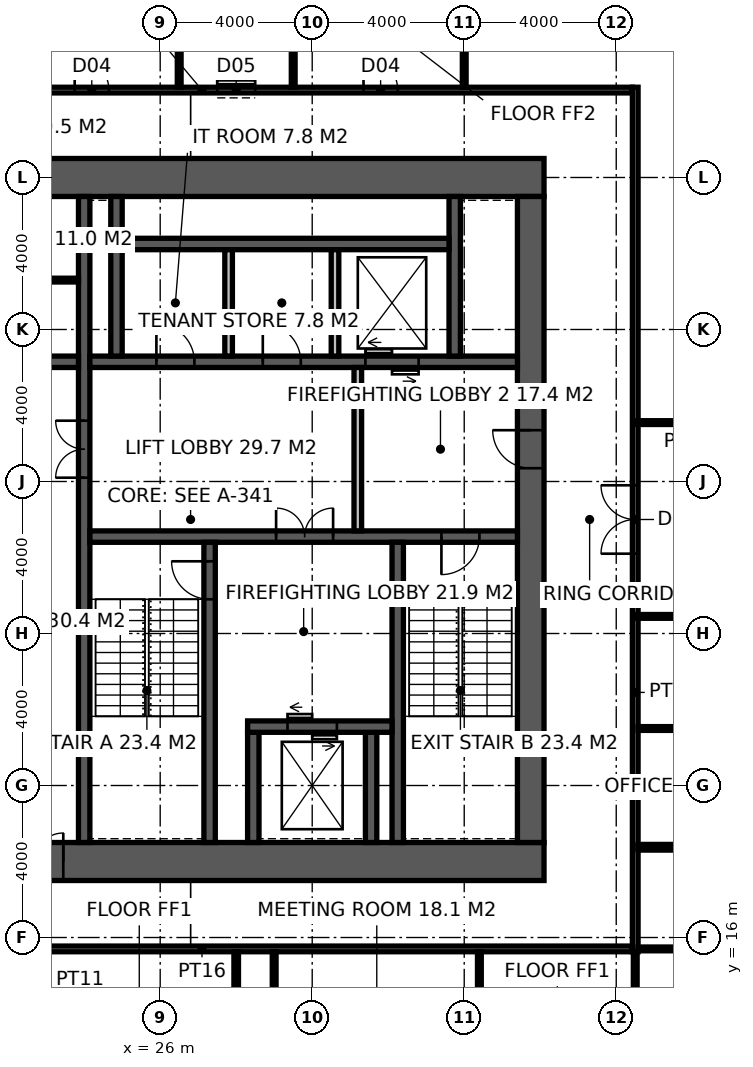
"""IFC4 building model, lengths in metres.
Left out: names, types, materials, properties, quantities, classifications, styles, units other than length and angle.
Written with IfcOpenShell. Run it as: python <this file> out.ifc"""

import sys

from ifc_helpers import new_model, si_unit, direction, frame, frame_2d, origin, place, context, subcontext, project, spatial, rectangle, extrude, element, fill, save


model = new_model("IFC4")
c1 = context("Model", 3, precision=1e-05, world=origin(), true_north=direction((0.0, 1.0)))
c2 = subcontext(c1, "Body", "Model", "MODEL_VIEW")
j1 = project(units=[si_unit("LENGTHUNIT", "METRE"), si_unit("PLANEANGLEUNIT", "RADIAN")], contexts=[c1])
p1 = place(None, origin())
s1 = spatial("IfcSite", under=j1, at=p1, CompositionType="ELEMENT")
p2 = place(p1, origin())
s2 = spatial("IfcBuilding", under=s1, at=p2, CompositionType="ELEMENT")
p3 = place(p2, frame((0.0, 0.0, 266.2)))
s3 = spatial("IfcBuildingStorey", under=s2, at=p3, CompositionType="ELEMENT", Elevation=266.2)
p4 = place(p3, frame((18.5, 18.0, -0.15), z_axis=(0.0, 0.0, 1.0), x_axis=(1.0, 0.0, 0.0)))
e1 = element("IfcWall", 1, at=p4, inside=s3, PredefinedType="SHEAR", context=c2, shape_type="SweptSolid", body=[
    extrude(rectangle(XDim=17.6, YDim=1.0, at=frame_2d((8.8, 0.0))), origin(), (0.0, 0.0, 1.0), 4.0),
])
p5 = place(p4, frame((3.45, 0.0, 0.15)))
e2 = element("IfcOpeningElement", 2, at=p5, cuts=e1, PredefinedType="OPENING", context=c2, shape_type="SweptSolid", body=[
    extrude(rectangle(XDim=1.5, YDim=2.4, at=frame_2d((0.75, 1.2))), frame((0.0, 0.51, 0.0), z_axis=(0.0, -1.0, 0.0), x_axis=(1.0, 0.0, 0.0)), (0.0, 0.0, 1.0), 1.02),
])
p6 = place(p3, frame((18.5, 36.0, -0.15), z_axis=(0.0, 0.0, 1.0), x_axis=(1.0, 0.0, 0.0)))
e3 = element("IfcWall", 3, at=p6, inside=s3, PredefinedType="SHEAR", context=c2, shape_type="SweptSolid", body=[
    extrude(rectangle(XDim=17.6, YDim=1.0, at=frame_2d((8.8, 0.0))), origin(), (0.0, 0.0, 1.0), 4.0),
])
p7 = place(p3, frame((35.75, 18.5, -0.15), z_axis=(0.0, 0.0, 1.0), x_axis=(0.0, 1.0, 0.0)))
e4 = element("IfcWall", 4, at=p7, inside=s3, PredefinedType="SHEAR", context=c2, shape_type="SweptSolid", body=[
    extrude(rectangle(XDim=17.0, YDim=0.7, at=frame_2d((8.5, 0.0))), origin(), (0.0, 0.0, 1.0), 4.0),
])
p8 = place(p7, frame((9.85, 0.0, 0.15)))
e5 = element("IfcOpeningElement", 5, at=p8, cuts=e4, PredefinedType="OPENING", context=c2, shape_type="SweptSolid", body=[
    extrude(rectangle(XDim=1.0, YDim=2.2, at=frame_2d((0.5, 1.1))), frame((0.0, 0.36, 0.0), z_axis=(0.0, -1.0, 0.0), x_axis=(1.0, 0.0, 0.0)), (0.0, 0.0, 1.0), 0.72),
])
p9 = place(p3, frame((24.0, 18.5, -0.15), z_axis=(0.0, 0.0, 1.0), x_axis=(0.0, 1.0, 0.0)))
e6 = element("IfcWall", 6, at=p9, inside=s3, PredefinedType="SHEAR", context=c2, shape_type="SweptSolid", body=[
    extrude(rectangle(XDim=17.0, YDim=0.3, at=frame_2d((8.5, 0.0))), origin(), (0.0, 0.0, 1.0), 4.0),
])
p10 = place(p9, frame((9.6, 0.0, 0.15)))
e7 = element("IfcOpeningElement", 7, at=p10, cuts=e6, PredefinedType="OPENING", context=c2, shape_type="SweptSolid", body=[
    extrude(rectangle(XDim=1.5, YDim=2.4, at=frame_2d((0.75, 1.2))), frame((0.0, 0.16, 0.0), z_axis=(0.0, -1.0, 0.0), x_axis=(1.0, 0.0, 0.0)), (0.0, 0.0, 1.0), 0.32),
])
p11 = place(p3, frame((24.15, 26.55, -0.15), z_axis=(0.0, 0.0, 1.0), x_axis=(1.0, 0.0, 0.0)))
e8 = element("IfcWall", 8, at=p11, inside=s3, PredefinedType="SHEAR", context=c2, shape_type="SweptSolid", body=[
    extrude(rectangle(XDim=11.25, YDim=0.3, at=frame_2d((5.625, 0.0))), origin(), (0.0, 0.0, 1.0), 4.0),
])
p12 = place(p11, frame((9.25, 0.0, 0.15)))
e9 = element("IfcOpeningElement", 9, at=p12, cuts=e8, PredefinedType="OPENING", context=c2, shape_type="SweptSolid", body=[
    extrude(rectangle(XDim=1.0, YDim=2.2, at=frame_2d((0.5, 1.1))), frame((0.0, 0.16, 0.0), z_axis=(0.0, -1.0, 0.0), x_axis=(1.0, 0.0, 0.0)), (0.0, 0.0, 1.0), 0.32),
])
p13 = place(p11, frame((4.9, 0.0, 0.15)))
e10 = element("IfcOpeningElement", 10, at=p13, cuts=e8, PredefinedType="OPENING", context=c2, shape_type="SweptSolid", body=[
    extrude(rectangle(XDim=1.5, YDim=2.4, at=frame_2d((0.75, 1.2))), frame((0.0, 0.16, 0.0), z_axis=(0.0, -1.0, 0.0), x_axis=(1.0, 0.0, 0.0)), (0.0, 0.0, 1.0), 0.32),
])
p14 = place(p3, frame((27.3, 18.5, -0.15), z_axis=(0.0, 0.0, 1.0), x_axis=(0.0, 1.0, 0.0)))
e11 = element("IfcWall", 11, at=p14, inside=s3, PredefinedType="SHEAR", context=c2, shape_type="SweptSolid", body=[
    extrude(rectangle(XDim=7.9, YDim=0.3, at=frame_2d((3.95, 0.0))), origin(), (0.0, 0.0, 1.0), 4.0),
])
p15 = place(p14, frame((6.4, 0.0, 0.15)))
e12 = element("IfcOpeningElement", 12, at=p15, cuts=e11, PredefinedType="OPENING", context=c2, shape_type="SweptSolid", body=[
    extrude(rectangle(XDim=1.0, YDim=2.2, at=frame_2d((0.5, 1.1))), frame((0.0, 0.16, 0.0), z_axis=(0.0, -1.0, 0.0), x_axis=(1.0, 0.0, 0.0)), (0.0, 0.0, 1.0), 0.32),
])
p16 = place(p3, frame((32.25, 18.5, -0.15), z_axis=(0.0, 0.0, 1.0), x_axis=(0.0, 1.0, 0.0)))
e13 = element("IfcWall", 13, at=p16, inside=s3, PredefinedType="SHEAR", context=c2, shape_type="SweptSolid", body=[
    extrude(rectangle(XDim=7.9, YDim=0.3, at=frame_2d((3.95, 0.0))), origin(), (0.0, 0.0, 1.0), 4.0),
])
for number, where, z_axis, x_axis in (
    (14, (28.45, 18.5, -0.15), (0.0, 0.0, 1.0), (0.0, 1.0, 0.0)),
    (15, (31.55, 18.5, -0.15), (0.0, 0.0, 1.0), (0.0, 1.0, 0.0)),
):
    element("IfcWall", number, at=place(p3, frame(where, z_axis=z_axis, x_axis=x_axis)), inside=s3, PredefinedType="SHEAR", context=c2, shape_type="SweptSolid", body=[
        extrude(rectangle(XDim=2.9, YDim=0.3, at=frame_2d((1.45, 0.0))), origin(), (0.0, 0.0, 1.0), 4.0),
    ])
p17 = place(p3, frame((28.3, 21.55, -0.15), z_axis=(0.0, 0.0, 1.0), x_axis=(1.0, 0.0, 0.0)))
e16 = element("IfcWall", 16, at=p17, inside=s3, PredefinedType="SHEAR", context=c2, shape_type="SweptSolid", body=[
    extrude(rectangle(XDim=3.8, YDim=0.3, at=frame_2d((1.9, 0.0))), origin(), (0.0, 0.0, 1.0), 4.0),
])
p18 = place(p17, frame((1.05, 0.0, 0.15)))
e17 = element("IfcOpeningElement", 17, at=p18, cuts=e16, PredefinedType="OPENING", context=c2, shape_type="SweptSolid", body=[
    extrude(rectangle(XDim=1.3, YDim=2.4, at=frame_2d((0.65, 1.2))), frame((0.0, 0.16, 0.0), z_axis=(0.0, -1.0, 0.0), x_axis=(1.0, 0.0, 0.0)), (0.0, 0.0, 1.0), 0.32),
])
p19 = place(p3, frame((24.15, 31.15, -0.15), z_axis=(0.0, 0.0, 1.0), x_axis=(1.0, 0.0, 0.0)))
e18 = element("IfcWall", 18, at=p19, inside=s3, PredefinedType="SHEAR", context=c2, shape_type="SweptSolid", body=[
    extrude(rectangle(XDim=11.25, YDim=0.3, at=frame_2d((5.625, 0.0))), origin(), (0.0, 0.0, 1.0), 4.0),
])
p20 = place(p19, frame((1.75, 0.0, 0.15)))
e19 = element("IfcOpeningElement", 19, at=p20, cuts=e18, PredefinedType="OPENING", context=c2, shape_type="SweptSolid", body=[
    extrude(rectangle(XDim=1.0, YDim=2.2, at=frame_2d((0.5, 1.1))), frame((0.0, 0.16, 0.0), z_axis=(0.0, -1.0, 0.0), x_axis=(1.0, 0.0, 0.0)), (0.0, 0.0, 1.0), 0.32),
])
p21 = place(p19, frame((4.55, 0.0, 0.15)))
e20 = element("IfcOpeningElement", 20, at=p21, cuts=e18, PredefinedType="OPENING", context=c2, shape_type="SweptSolid", body=[
    extrude(rectangle(XDim=1.0, YDim=2.2, at=frame_2d((0.5, 1.1))), frame((0.0, 0.16, 0.0), z_axis=(0.0, -1.0, 0.0), x_axis=(1.0, 0.0, 0.0)), (0.0, 0.0, 1.0), 0.32),
])
p22 = place(p19, frame((7.25, 0.0, 0.15)))
e21 = element("IfcOpeningElement", 21, at=p22, cuts=e18, PredefinedType="OPENING", context=c2, shape_type="SweptSolid", body=[
    extrude(rectangle(XDim=1.4, YDim=2.4, at=frame_2d((0.7, 1.2))), frame((0.0, 0.16, 0.0), z_axis=(0.0, -1.0, 0.0), x_axis=(1.0, 0.0, 0.0)), (0.0, 0.0, 1.0), 0.32),
])
p23 = place(p3, frame((18.5, 31.15, -0.15), z_axis=(0.0, 0.0, 1.0), x_axis=(1.0, 0.0, 0.0)))
e22 = element("IfcWall", 22, at=p23, inside=s3, PredefinedType="SHEAR", context=c2, shape_type="SweptSolid", body=[
    extrude(rectangle(XDim=5.35, YDim=0.3, at=frame_2d((2.675, 0.0))), origin(), (0.0, 0.0, 1.0), 4.0),
])
p24 = place(p23, frame((3.4, 0.0, 0.15)))
e23 = element("IfcOpeningElement", 23, at=p24, cuts=e22, PredefinedType="OPENING", context=c2, shape_type="SweptSolid", body=[
    extrude(rectangle(XDim=1.0, YDim=2.2, at=frame_2d((0.5, 1.1))), frame((0.0, 0.16, 0.0), z_axis=(0.0, -1.0, 0.0), x_axis=(1.0, 0.0, 0.0)), (0.0, 0.0, 1.0), 0.32),
])
for number, where, z_axis, x_axis in (
    (24, (24.85, 31.3, -0.15), (0.0, 0.0, 1.0), (0.0, 1.0, 0.0)),
    (25, (33.75, 31.3, -0.15), (0.0, 0.0, 1.0), (0.0, 1.0, 0.0)),
):
    element("IfcWall", number, at=place(p3, frame(where, z_axis=z_axis, x_axis=x_axis)), inside=s3, PredefinedType="SHEAR", context=c2, shape_type="SweptSolid", body=[
        extrude(rectangle(XDim=4.2, YDim=0.3, at=frame_2d((2.1, 0.0))), origin(), (0.0, 0.0, 1.0), 4.0),
    ])
p25 = place(p3, frame((25.0, 34.25, -0.15), z_axis=(0.0, 0.0, 1.0), x_axis=(1.0, 0.0, 0.0)))
e26 = element("IfcWall", 26, at=p25, inside=s3, PredefinedType="SHEAR", context=c2, shape_type="SweptSolid", body=[
    extrude(rectangle(XDim=8.6, YDim=0.3, at=frame_2d((4.3, 0.0))), origin(), (0.0, 0.0, 1.0), 4.0),
])
p26 = place(p3, frame((27.8, 31.3, 0.0), z_axis=(0.0, 0.0, 1.0), x_axis=(0.0, 1.0, 0.0)))
e27 = element("IfcWall", 27, at=p26, inside=s3, PredefinedType="SOLIDWALL", context=c2, shape_type="SweptSolid", body=[
    extrude(rectangle(XDim=2.8, YDim=0.2, at=frame_2d((1.4, 0.0))), origin(), (0.0, 0.0, 1.0), 3.85),
])
p27 = place(p3, frame((30.6, 31.3, -0.15), z_axis=(0.0, 0.0, 1.0), x_axis=(0.0, 1.0, 0.0)))
e28 = element("IfcWall", 28, at=p27, inside=s3, PredefinedType="SOLIDWALL", context=c2, shape_type="SweptSolid", body=[
    extrude(rectangle(XDim=2.8, YDim=0.2, at=frame_2d((1.4, 0.0))), origin(), (0.0, 0.0, 1.0), 4.0),
])
p28 = place(p3, frame((31.2, 26.7, 0.0), z_axis=(0.0, 0.0, 1.0), x_axis=(0.0, 1.0, 0.0)))
e29 = element("IfcWall", 29, at=p28, inside=s3, PredefinedType="SOLIDWALL", context=c2, shape_type="SweptSolid", body=[
    extrude(rectangle(XDim=4.3, YDim=0.2, at=frame_2d((2.15, 0.0))), origin(), (0.0, 0.0, 1.0), 3.85),
])
p29 = place(p3, frame((18.5, 33.3, 0.0), z_axis=(0.0, 0.0, 1.0), x_axis=(1.0, 0.0, 0.0)))
e30 = element("IfcWall", 30, at=p29, inside=s3, PredefinedType="PARTITIONING", context=c2, shape_type="SweptSolid", body=[
    extrude(rectangle(XDim=5.35, YDim=0.1, at=frame_2d((2.675, 0.0))), origin(), (0.0, 0.0, 1.0), 3.85),
])
p30 = place(p29, frame((1.2, 0.0, 0.0)))
e31 = element("IfcOpeningElement", 31, at=p30, cuts=e30, PredefinedType="OPENING", context=c2, shape_type="SweptSolid", body=[
    extrude(rectangle(XDim=1.0, YDim=2.2, at=frame_2d((0.5, 1.1))), frame((0.0, 0.06, 0.0), z_axis=(0.0, -1.0, 0.0), x_axis=(1.0, 0.0, 0.0)), (0.0, 0.0, 1.0), 0.12),
])
p31 = place(p3, frame((38.5, 15.625, 0.0), z_axis=(0.0, 0.0, 1.0), x_axis=(0.0, 1.0, 0.0)))
e32 = element("IfcWall", 32, at=p31, inside=s3, PredefinedType="PARTITIONING", context=c2, shape_type="SweptSolid", body=[
    extrude(rectangle(XDim=22.75, YDim=0.15, at=frame_2d((11.375, 0.0))), origin(), (0.0, 0.0, 1.0), 2.65),
])
p32 = place(p31, frame((10.475, 0.0, 0.0)))
e33 = element("IfcOpeningElement", 33, at=p32, cuts=e32, PredefinedType="OPENING", context=c2, shape_type="SweptSolid", body=[
    extrude(rectangle(XDim=1.8, YDim=2.4, at=frame_2d((0.9, 1.2))), frame((0.0, 0.085, 0.0), z_axis=(0.0, -1.0, 0.0), x_axis=(1.0, 0.0, 0.0)), (0.0, 0.0, 1.0), 0.17),
])
p33 = place(p3, frame((15.775, 15.7, 0.0), z_axis=(0.0, 0.0, 1.0), x_axis=(1.0, 0.0, 0.0)))
e34 = element("IfcWall", 34, at=p33, inside=s3, PredefinedType="PARTITIONING", context=c2, shape_type="SweptSolid", body=[
    extrude(rectangle(XDim=22.65, YDim=0.15, at=frame_2d((11.325, 0.0))), origin(), (0.0, 0.0, 1.0), 3.85),
])
p34 = place(p3, frame((15.775, 38.3, 0.0), z_axis=(0.0, 0.0, 1.0), x_axis=(1.0, 0.0, 0.0)))
e35 = element("IfcWall", 35, at=p34, inside=s3, PredefinedType="PARTITIONING", context=c2, shape_type="SweptSolid", body=[
    extrude(rectangle(XDim=22.65, YDim=0.15, at=frame_2d((11.325, 0.0))), origin(), (0.0, 0.0, 1.0), 3.85),
])
p35 = place(p34, frame((7.975, 0.0, 0.0)))
e36 = element("IfcOpeningElement", 36, at=p35, cuts=e35, PredefinedType="OPENING", context=c2, shape_type="SweptSolid", body=[
    extrude(rectangle(XDim=0.9, YDim=2.1, at=frame_2d((0.45, 1.05))), frame((0.0, 0.085, 0.0), z_axis=(0.0, -1.0, 0.0), x_axis=(1.0, 0.0, 0.0)), (0.0, 0.0, 1.0), 0.17),
])
p36 = place(p34, frame((11.725, 0.0, 0.0)))
e37 = element("IfcOpeningElement", 37, at=p36, cuts=e35, PredefinedType="OPENING", context=c2, shape_type="SweptSolid", body=[
    extrude(rectangle(XDim=1.0, YDim=2.1, at=frame_2d((0.5, 1.05))), frame((0.0, 0.085, 0.0), z_axis=(0.0, -1.0, 0.0), x_axis=(1.0, 0.0, 0.0)), (0.0, 0.0, 1.0), 0.17),
])
p37 = place(p34, frame((15.575, 0.0, 0.0)))
e38 = element("IfcOpeningElement", 38, at=p37, cuts=e35, PredefinedType="OPENING", context=c2, shape_type="SweptSolid", body=[
    extrude(rectangle(XDim=0.9, YDim=2.1, at=frame_2d((0.45, 1.05))), frame((0.0, 0.085, 0.0), z_axis=(0.0, -1.0, 0.0), x_axis=(1.0, 0.0, 0.0)), (0.0, 0.0, 1.0), 0.17),
])
p38 = place(p3, frame((34.0, 38.375, 0.0), z_axis=(0.0, 0.0, 1.0), x_axis=(0.0, 1.0, 0.0)))
e39 = element("IfcWall", 39, at=p38, inside=s3, PredefinedType="PARTITIONING", context=c2, shape_type="SweptSolid", body=[
    extrude(rectangle(XDim=3.675, YDim=0.1, at=frame_2d((1.837, 0.0))), origin(), (0.0, 0.0, 1.0), 2.65),
])
for number, where, z_axis, x_axis in (
    (40, (26.5, 38.375, 0.0), (0.0, 0.0, 1.0), (0.0, 1.0, 0.0)),
    (41, (29.5, 38.375, 0.0), (0.0, 0.0, 1.0), (0.0, 1.0, 0.0)),
):
    element("IfcWall", number, at=place(p3, frame(where, z_axis=z_axis, x_axis=x_axis)), inside=s3, PredefinedType="PARTITIONING", context=c2, shape_type="SweptSolid", body=[
        extrude(rectangle(XDim=3.575, YDim=0.1, at=frame_2d((1.788, 0.0))), origin(), (0.0, 0.0, 1.0), 2.65),
    ])
p39 = place(p3, frame((28.0, 4.3, 0.0), z_axis=(0.0, 0.0, 1.0), x_axis=(0.0, 1.0, 0.0)))
e42 = element("IfcWall", 42, at=p39, inside=s3, PredefinedType="PARTITIONING", context=c2, shape_type="SweptSolid", body=[
    extrude(rectangle(XDim=11.325, YDim=0.12, at=frame_2d((5.663, 0.0))), origin(), (0.0, 0.0, 1.0), 3.85),
])
for number, where, z_axis, x_axis in (
    (43, (38.575, 15.7, 0.0), (0.0, 0.0, 1.0), (1.0, 0.0, 0.0)),
    (44, (38.575, 18.35, 0.0), (0.0, 0.0, 1.0), (1.0, 0.0, 0.0)),
    (45, (38.575, 18.4, 0.0), (0.0, 0.0, 1.0), (1.0, 0.0, 0.0)),
    (46, (38.575, 21.5, 0.0), (0.0, 0.0, 1.0), (1.0, 0.0, 0.0)),
):
    element("IfcWall", number, at=place(p3, frame(where, z_axis=z_axis, x_axis=x_axis)), inside=s3, PredefinedType="PARTITIONING", context=c2, shape_type="SweptSolid", body=[
        extrude(rectangle(XDim=3.575, YDim=0.1, at=frame_2d((1.788, 0.0))), origin(), (0.0, 0.0, 1.0), 3.85),
    ])
for number, where, z_axis, x_axis in (
    (47, (28.999, 12.15, 0.0), (0.0, 0.0, 1.0), (0.0, 1.0, 0.0)),
    (48, (34.399, 12.15, 0.0), (0.0, 0.0, 1.0), (0.0, 1.0, 0.0)),
    (49, (38.5, 12.15, 0.0), (0.0, 0.0, 1.0), (0.0, 1.0, 0.0)),
):
    element("IfcWall", number, at=place(p3, frame(where, z_axis=z_axis, x_axis=x_axis)), inside=s3, PredefinedType="PARTITIONING", context=c2, shape_type="SweptSolid", body=[
        extrude(rectangle(XDim=3.475, YDim=0.1, at=frame_2d((1.738, 0.0))), origin(), (0.0, 0.0, 1.0), 3.85),
    ])
p40 = place(p3, frame((38.5, 24.45, 0.0), z_axis=(0.0, 0.0, 1.0), x_axis=(1.0, 0.0, 0.0)))
e50 = element("IfcWall", 50, at=p40, inside=s3, PredefinedType="PARTITIONING", context=c2, shape_type="SweptSolid", body=[
    extrude(rectangle(XDim=4.5, YDim=0.1, at=frame_2d((2.25, 0.0))), origin(), (0.0, 0.0, 1.0), 2.65),
])
p41 = place(p3, frame((43.0, 29.55, 0.0), z_axis=(0.0, 0.0, 1.0), x_axis=(-1.0, 0.0, 0.0)))
e51 = element("IfcWall", 51, at=p41, inside=s3, PredefinedType="PARTITIONING", context=c2, shape_type="SweptSolid", body=[
    extrude(rectangle(XDim=4.5, YDim=0.1, at=frame_2d((2.25, 0.0))), origin(), (0.0, 0.0, 1.0), 3.85),
])
p42 = place(p15, origin())
e52 = element("IfcDoor", 52, at=p42, inside=s3, OperationType="SINGLE_SWING_RIGHT", PredefinedType="DOOR", context=c2, shape_type="SweptSolid", body=[
    extrude(rectangle(XDim=1.0, YDim=2.2, at=frame_2d((0.5, 1.1))), frame((0.0, 0.025, 0.0), z_axis=(0.0, -1.0, 0.0), x_axis=(1.0, 0.0, 0.0)), (0.0, 0.0, 1.0), 0.05),
])
fill(e12, e52)
p43 = place(p12, frame((1.0, 0.0, 0.0), z_axis=(0.0, 0.0, 1.0), x_axis=(-1.0, 0.0, 0.0)))
e53 = element("IfcDoor", 53, at=p43, inside=s3, OperationType="SINGLE_SWING_RIGHT", PredefinedType="DOOR", context=c2, shape_type="SweptSolid", body=[
    extrude(rectangle(XDim=1.0, YDim=2.2, at=frame_2d((0.5, 1.1))), frame((0.0, 0.025, 0.0), z_axis=(0.0, -1.0, 0.0), x_axis=(1.0, 0.0, 0.0)), (0.0, 0.0, 1.0), 0.05),
])
fill(e9, e53)
p44 = place(p8, origin())
e54 = element("IfcDoor", 54, at=p44, inside=s3, OperationType="SINGLE_SWING_RIGHT", PredefinedType="DOOR", context=c2, shape_type="SweptSolid", body=[
    extrude(rectangle(XDim=1.0, YDim=2.2, at=frame_2d((0.5, 1.1))), frame((0.0, 0.025, 0.0), z_axis=(0.0, -1.0, 0.0), x_axis=(1.0, 0.0, 0.0)), (0.0, 0.0, 1.0), 0.05),
])
fill(e5, e54)
p45 = place(p13, origin())
e55 = element("IfcDoor", 55, at=p45, inside=s3, OperationType="DOUBLE_DOOR_DOUBLE_SWING", PredefinedType="DOOR", context=c2, shape_type="SweptSolid", body=[
    extrude(rectangle(XDim=1.5, YDim=2.4, at=frame_2d((0.75, 1.2))), frame((0.0, 0.025, 0.0), z_axis=(0.0, -1.0, 0.0), x_axis=(1.0, 0.0, 0.0)), (0.0, 0.0, 1.0), 0.05),
])
fill(e10, e55)
p46 = place(p10, origin())
e56 = element("IfcDoor", 56, at=p46, inside=s3, OperationType="DOUBLE_DOOR_DOUBLE_SWING", PredefinedType="DOOR", context=c2, shape_type="SweptSolid", body=[
    extrude(rectangle(XDim=1.5, YDim=2.4, at=frame_2d((0.75, 1.2))), frame((0.0, 0.025, 0.0), z_axis=(0.0, -1.0, 0.0), x_axis=(1.0, 0.0, 0.0)), (0.0, 0.0, 1.0), 0.05),
])
fill(e7, e56)
p47 = place(p20, origin())
e57 = element("IfcDoor", 57, at=p47, inside=s3, OperationType="SINGLE_SWING_LEFT", PredefinedType="DOOR", context=c2, shape_type="SweptSolid", body=[
    extrude(rectangle(XDim=1.0, YDim=2.2, at=frame_2d((0.5, 1.1))), frame((0.0, 0.025, 0.0), z_axis=(0.0, -1.0, 0.0), x_axis=(1.0, 0.0, 0.0)), (0.0, 0.0, 1.0), 0.05),
])
fill(e19, e57)
p48 = place(p21, origin())
e58 = element("IfcDoor", 58, at=p48, inside=s3, OperationType="SINGLE_SWING_LEFT", PredefinedType="DOOR", context=c2, shape_type="SweptSolid", body=[
    extrude(rectangle(XDim=1.0, YDim=2.2, at=frame_2d((0.5, 1.1))), frame((0.0, 0.025, 0.0), z_axis=(0.0, -1.0, 0.0), x_axis=(1.0, 0.0, 0.0)), (0.0, 0.0, 1.0), 0.05),
])
fill(e20, e58)
p49 = place(p5, origin())
e59 = element("IfcDoor", 59, at=p49, inside=s3, OperationType="DOUBLE_DOOR_DOUBLE_SWING", PredefinedType="DOOR", context=c2, shape_type="SweptSolid", body=[
    extrude(rectangle(XDim=1.5, YDim=2.4, at=frame_2d((0.75, 1.2))), frame((0.0, 0.025, 0.0), z_axis=(0.0, -1.0, 0.0), x_axis=(1.0, 0.0, 0.0)), (0.0, 0.0, 1.0), 0.05),
])
fill(e2, e59)
p50 = place(p35, origin())
e60 = element("IfcDoor", 60, at=p50, inside=s3, OperationType="SINGLE_SWING_LEFT", PredefinedType="DOOR", context=c2, shape_type="SweptSolid", body=[
    extrude(rectangle(XDim=0.9, YDim=2.1, at=frame_2d((0.45, 1.05))), frame((0.0, 0.025, 0.0), z_axis=(0.0, -1.0, 0.0), x_axis=(1.0, 0.0, 0.0)), (0.0, 0.0, 1.0), 0.05),
])
fill(e36, e60)
p51 = place(p36, origin())
e61 = element("IfcDoor", 61, at=p51, inside=s3, OperationType="SLIDING_TO_LEFT", PredefinedType="DOOR", context=c2, shape_type="SweptSolid", body=[
    extrude(rectangle(XDim=1.0, YDim=2.1, at=frame_2d((0.5, 1.05))), frame((0.0, 0.025, 0.0), z_axis=(0.0, -1.0, 0.0), x_axis=(1.0, 0.0, 0.0)), (0.0, 0.0, 1.0), 0.05),
])
fill(e37, e61)
p52 = place(p37, origin())
e62 = element("IfcDoor", 62, at=p52, inside=s3, OperationType="SINGLE_SWING_LEFT", PredefinedType="DOOR", context=c2, shape_type="SweptSolid", body=[
    extrude(rectangle(XDim=0.9, YDim=2.1, at=frame_2d((0.45, 1.05))), frame((0.0, 0.025, 0.0), z_axis=(0.0, -1.0, 0.0), x_axis=(1.0, 0.0, 0.0)), (0.0, 0.0, 1.0), 0.05),
])
fill(e38, e62)
p53 = place(p32, origin())
e63 = element("IfcDoor", 63, at=p53, inside=s3, OperationType="DOUBLE_DOOR_DOUBLE_SWING", PredefinedType="DOOR", context=c2, shape_type="SweptSolid", body=[
    extrude(rectangle(XDim=1.8, YDim=2.4, at=frame_2d((0.9, 1.2))), frame((0.0, 0.025, 0.0), z_axis=(0.0, -1.0, 0.0), x_axis=(1.0, 0.0, 0.0)), (0.0, 0.0, 1.0), 0.05),
])
fill(e33, e63)
p54 = place(p18, origin())
e64 = element("IfcDoor", 64, at=p54, inside=s3, OperationType="DOUBLE_DOOR_SLIDING", PredefinedType="DOOR", context=c2, shape_type="SweptSolid", body=[
    extrude(rectangle(XDim=1.3, YDim=2.4, at=frame_2d((0.65, 1.2))), frame((0.0, 0.025, 0.0), z_axis=(0.0, -1.0, 0.0), x_axis=(1.0, 0.0, 0.0)), (0.0, 0.0, 1.0), 0.05),
])
fill(e17, e64)
p55 = place(p22, origin())
e65 = element("IfcDoor", 65, at=p55, inside=s3, OperationType="DOUBLE_DOOR_SLIDING", PredefinedType="DOOR", context=c2, shape_type="SweptSolid", body=[
    extrude(rectangle(XDim=1.4, YDim=2.4, at=frame_2d((0.7, 1.2))), frame((0.0, 0.025, 0.0), z_axis=(0.0, -1.0, 0.0), x_axis=(1.0, 0.0, 0.0)), (0.0, 0.0, 1.0), 0.05),
])
fill(e21, e65)
save(model, sys.argv[1])
